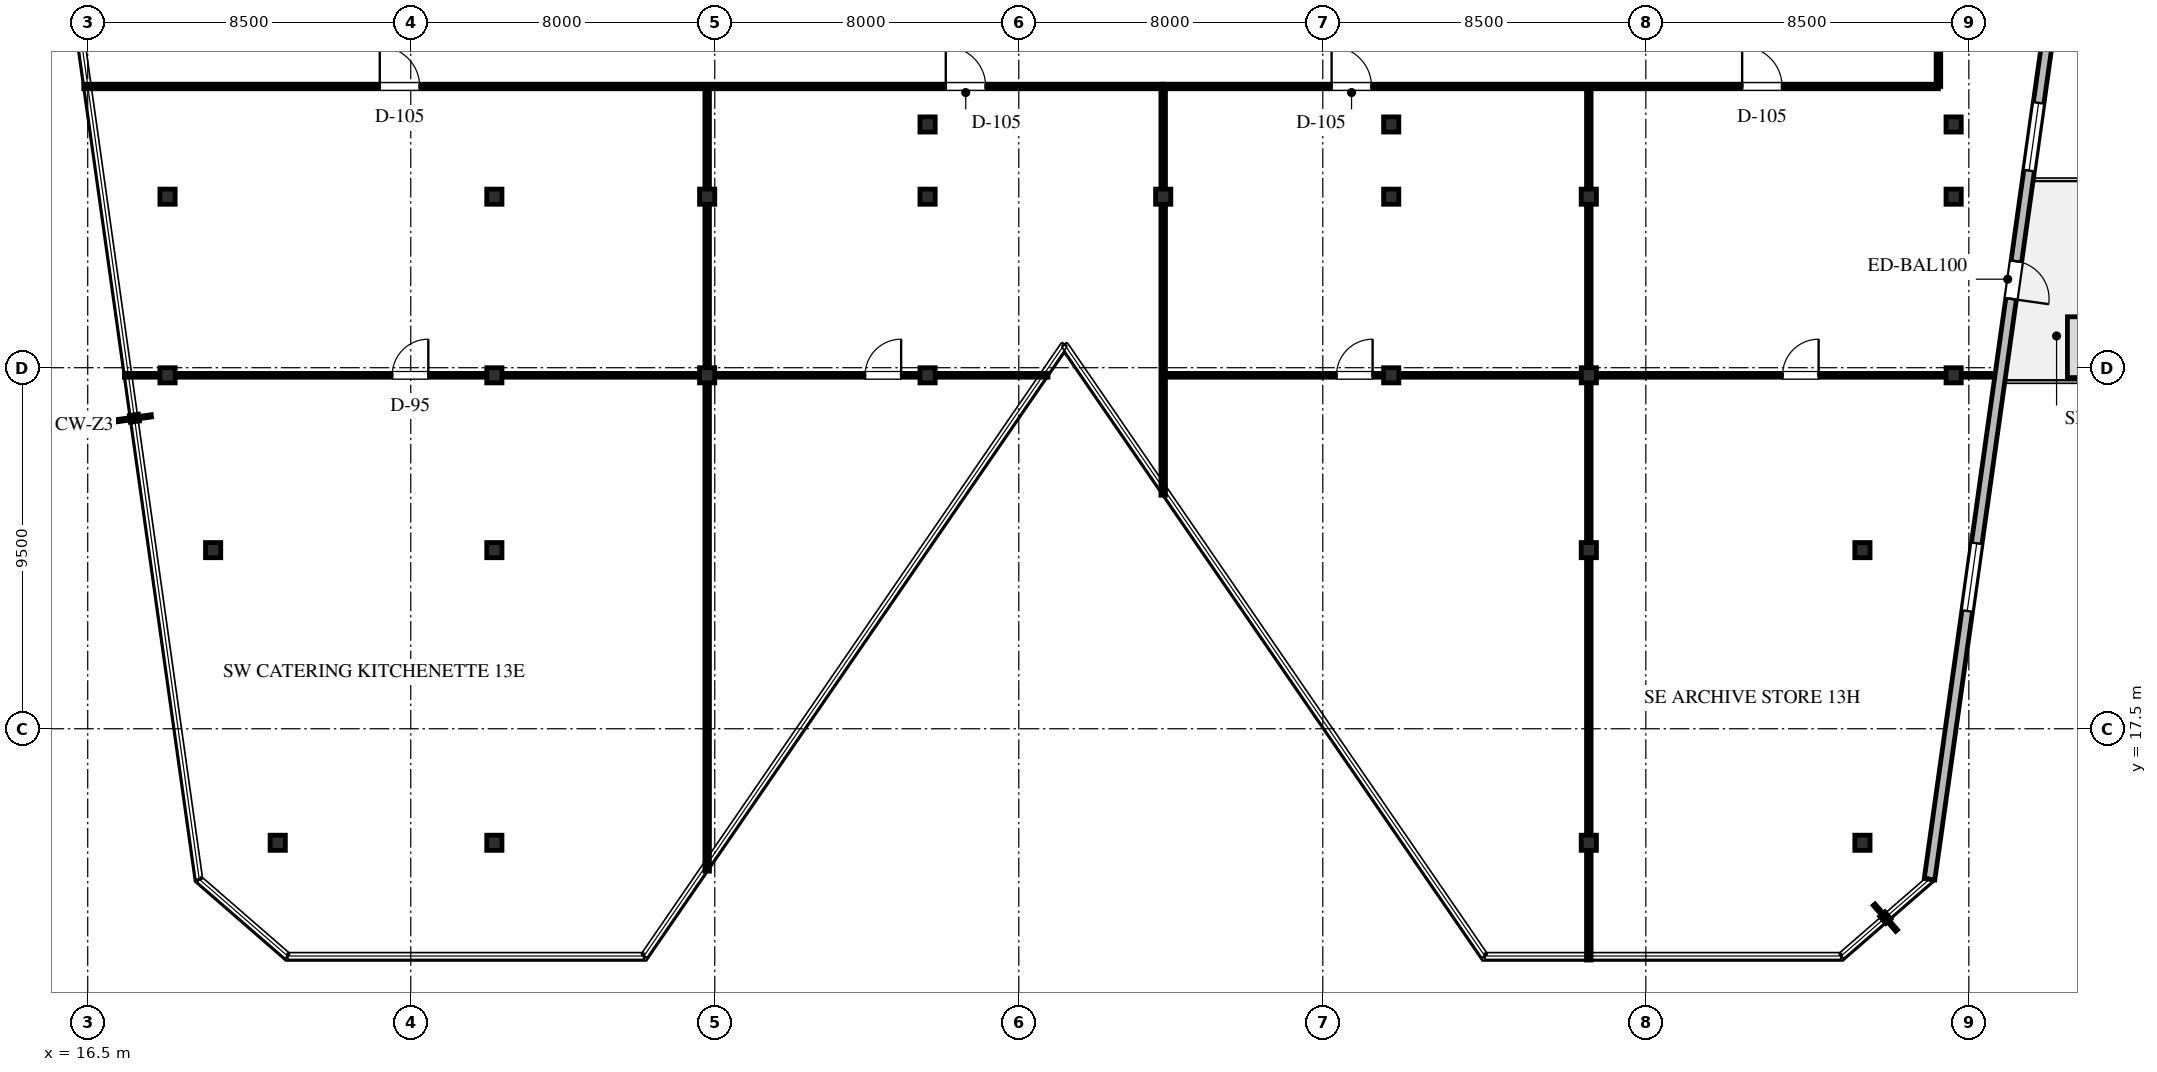
"""IFC4 building model, lengths in metres.
Left out: names, types, materials, properties, quantities, classifications, styles, units other than length and angle.
Written with IfcOpenShell. Run it as: python <this file> out.ifc"""

import sys

from ifc_helpers import new_model, si_unit, direction, frame, frame_2d, origin, origin_2d, place, context, subcontext, project, spatial, rectangle, i_section, extrude, element, fill, save


model = new_model("IFC4")
c1 = context("Model", 3, precision=1e-05, world=origin(), true_north=direction((0.0, 1.0)))
c2 = subcontext(c1, "Body", "Model", "MODEL_VIEW")
j1 = project(units=[si_unit("LENGTHUNIT", "METRE"), si_unit("PLANEANGLEUNIT", "RADIAN")], contexts=[c1])
p1 = place(None, origin())
s1 = spatial("IfcSite", under=j1, at=p1, CompositionType="ELEMENT")
p2 = place(p1, origin())
s2 = spatial("IfcBuilding", under=s1, at=p2, CompositionType="ELEMENT")
p3 = place(p2, frame((0.0, 0.0, 204.5)))
s3 = spatial("IfcBuildingStorey", under=s2, at=p3, CompositionType="ELEMENT", Elevation=204.5)
for number, where, z_axis, x_axis in (
    (1, (21.5, 14.5, 0.0), (0.0, 0.0, 1.0), (1.0, 0.0, 0.0)),
    (2, (18.6, 26.8, 0.0), (0.0, 0.0, 1.0), (1.0, 0.0, 0.0)),
    (3, (27.2, 26.8, 0.0), (0.0, 0.0, 1.0), (1.0, 0.0, 0.0)),
    (4, (32.8, 26.8, 0.0), (0.0, 0.0, 1.0), (1.0, 0.0, 0.0)),
    (5, (38.6, 26.8, 0.0), (0.0, 0.0, 1.0), (1.0, 0.0, 0.0)),
    (6, (50.8, 26.8, 0.0), (0.0, 0.0, 1.0), (1.0, 0.0, 0.0)),
    (7, (56.0, 26.8, 0.0), (0.0, 0.0, 1.0), (1.0, 0.0, 0.0)),
    (8, (65.6, 26.8, 0.0), (0.0, 0.0, 1.0), (1.0, 0.0, 0.0)),
    (9, (18.6, 31.5, 0.0), (0.0, 0.0, 1.0), (1.0, 0.0, 0.0)),
    (10, (27.2, 31.5, 0.0), (0.0, 0.0, 1.0), (1.0, 0.0, 0.0)),
    (11, (32.8, 31.5, 0.0), (0.0, 0.0, 1.0), (1.0, 0.0, 0.0)),
    (12, (27.2, 14.5, 0.0), (0.0, 0.0, 1.0), (1.0, 0.0, 0.0)),
    (13, (38.6, 31.5, 0.0), (0.0, 0.0, 1.0), (1.0, 0.0, 0.0)),
    (14, (44.8, 31.5, 0.0), (0.0, 0.0, 1.0), (1.0, 0.0, 0.0)),
    (15, (50.8, 31.5, 0.0), (0.0, 0.0, 1.0), (1.0, 0.0, 0.0)),
    (16, (56.0, 31.5, 0.0), (0.0, 0.0, 1.0), (1.0, 0.0, 0.0)),
    (17, (65.6, 31.5, 0.0), (0.0, 0.0, 1.0), (1.0, 0.0, 0.0)),
    (18, (56.0, 14.5, 0.0), (0.0, 0.0, 1.0), (1.0, 0.0, 0.0)),
    (19, (63.2, 14.5, 0.0), (0.0, 0.0, 1.0), (1.0, 0.0, 0.0)),
    (20, (19.8, 22.2, 0.0), (0.0, 0.0, 1.0), (1.0, 0.0, 0.0)),
    (21, (27.2, 22.2, 0.0), (0.0, 0.0, 1.0), (1.0, 0.0, 0.0)),
    (22, (56.0, 22.2, 0.0), (0.0, 0.0, 1.0), (1.0, 0.0, 0.0)),
    (23, (63.2, 22.2, 0.0), (0.0, 0.0, 1.0), (1.0, 0.0, 0.0)),
    (24, (38.6, 33.4, 0.0), (0.0, 0.0, 1.0), (1.0, 0.0, 0.0)),
    (25, (50.8, 33.4, 0.0), (0.0, 0.0, 1.0), (1.0, 0.0, 0.0)),
    (26, (65.6, 33.4, 0.0), (0.0, 0.0, 1.0), (1.0, 0.0, 0.0)),
):
    element("IfcColumn", number, at=place(p3, frame(where, z_axis=z_axis, x_axis=x_axis)), inside=s3, PredefinedType="COLUMN", context=c2, shape_type="SweptSolid", body=[
        extrude(i_section(OverallWidth=0.401, OverallDepth=0.399, WebThickness=0.025, FlangeThickness=0.04, FilletRadius=0.03, at=origin_2d()), origin(), (0.0, 0.0, 1.0), 4.0),
    ])
p4 = place(p3, frame((68.375, 37.8, 0.0), z_axis=(0.0, 0.0, 1.0), x_axis=(-0.139173290738, -0.99026804207, 0.0)))
e27 = element("IfcWall", 27, at=p4, inside=s3, PredefinedType="STANDARD", context=c2, shape_type="SweptSolid", body=[
    extrude(rectangle(XDim=24.498, YDim=0.28, at=frame_2d((12.249, 0.0))), origin(), (0.0, 0.0, 1.0), 3.755),
])
p5 = place(p4, frame((8.077, 0.0, 0.0)))
e28 = element("IfcOpeningElement", 28, at=p5, cuts=e27, PredefinedType="OPENING", context=c2, shape_type="SweptSolid", body=[
    extrude(rectangle(XDim=1.0, YDim=2.15, at=frame_2d((0.5, 1.075))), frame((0.0, 0.15, 0.0), z_axis=(0.0, -1.0, 0.0), x_axis=(1.0, 0.0, 0.0)), (0.0, 0.0, 1.0), 0.3),
])
p6 = place(p4, frame((3.869, 0.0, 0.65)))
e29 = element("IfcOpeningElement", 29, at=p6, cuts=e27, PredefinedType="OPENING", context=c2, shape_type="SweptSolid", body=[
    extrude(rectangle(XDim=1.8, YDim=2.1, at=frame_2d((0.9, 1.05))), frame((0.0, 0.15, 0.0), z_axis=(0.0, -1.0, 0.0), x_axis=(1.0, 0.0, 0.0)), (0.0, 0.0, 1.0), 0.3),
])
p7 = place(p4, frame((15.571, 0.0, 0.65)))
e30 = element("IfcOpeningElement", 30, at=p7, cuts=e27, PredefinedType="OPENING", context=c2, shape_type="SweptSolid", body=[
    extrude(rectangle(XDim=1.8, YDim=2.1, at=frame_2d((0.9, 1.05))), frame((0.0, 0.15, 0.0), z_axis=(0.0, -1.0, 0.0), x_axis=(1.0, 0.0, 0.0)), (0.0, 0.0, 1.0), 0.3),
])
p8 = place(p3, frame((16.397, 34.4, 0.0), z_axis=(0.0, 0.0, 1.0), x_axis=(1.0, 0.0, 0.0)))
e31 = element("IfcWall", 31, at=p8, inside=s3, PredefinedType="PARTITIONING", context=c2, shape_type="SweptSolid", body=[
    extrude(rectangle(XDim=28.403, YDim=0.12, at=frame_2d((14.202, 0.0))), origin(), (0.0, 0.0, 1.0), 2.982),
])
p9 = place(p8, frame((7.788, 0.0, 0.0)))
e32 = element("IfcOpeningElement", 32, at=p9, cuts=e31, PredefinedType="OPENING", context=c2, shape_type="SweptSolid", body=[
    extrude(rectangle(XDim=1.05, YDim=2.2, at=frame_2d((0.525, 1.1))), frame((0.0, 0.07, 0.0), z_axis=(0.0, -1.0, 0.0), x_axis=(1.0, 0.0, 0.0)), (0.0, 0.0, 1.0), 0.14),
])
p10 = place(p8, frame((22.682, 0.0, 0.0)))
e33 = element("IfcOpeningElement", 33, at=p10, cuts=e31, PredefinedType="OPENING", context=c2, shape_type="SweptSolid", body=[
    extrude(rectangle(XDim=1.05, YDim=2.2, at=frame_2d((0.525, 1.1))), frame((0.0, 0.07, 0.0), z_axis=(0.0, -1.0, 0.0), x_axis=(1.0, 0.0, 0.0)), (0.0, 0.0, 1.0), 0.14),
])
p11 = place(p3, frame((44.8, 34.4, 0.0), z_axis=(0.0, 0.0, 1.0), x_axis=(1.0, 0.0, 0.0)))
e34 = element("IfcWall", 34, at=p11, inside=s3, PredefinedType="PARTITIONING", context=c2, shape_type="SweptSolid", body=[
    extrude(rectangle(XDim=20.4, YDim=0.12, at=frame_2d((10.2, 0.0))), origin(), (0.0, 0.0, 1.0), 2.982),
])
p12 = place(p11, frame((4.432, 0.0, 0.0)))
e35 = element("IfcOpeningElement", 35, at=p12, cuts=e34, PredefinedType="OPENING", context=c2, shape_type="SweptSolid", body=[
    extrude(rectangle(XDim=1.05, YDim=2.2, at=frame_2d((0.525, 1.1))), frame((0.0, 0.07, 0.0), z_axis=(0.0, -1.0, 0.0), x_axis=(1.0, 0.0, 0.0)), (0.0, 0.0, 1.0), 0.14),
])
p13 = place(p11, frame((15.235, 0.0, 0.0)))
e36 = element("IfcOpeningElement", 36, at=p13, cuts=e34, PredefinedType="OPENING", context=c2, shape_type="SweptSolid", body=[
    extrude(rectangle(XDim=1.05, YDim=2.2, at=frame_2d((0.525, 1.1))), frame((0.0, 0.07, 0.0), z_axis=(0.0, -1.0, 0.0), x_axis=(1.0, 0.0, 0.0)), (0.0, 0.0, 1.0), 0.14),
])
p14 = place(p3, frame((65.2, 34.4, 0.0), z_axis=(0.0, 0.0, 1.0), x_axis=(0.0, 1.0, 0.0)))
e37 = element("IfcWall", 37, at=p14, inside=s3, PredefinedType="PARTITIONING", context=c2, shape_type="SweptSolid", body=[
    extrude(rectangle(XDim=3.317, YDim=0.12, at=frame_2d((1.659, 0.0))), origin(), (0.0, 0.0, 1.0), 2.982),
])
p15 = place(p3, frame((17.465, 26.8, 0.0), z_axis=(0.0, 0.0, 1.0), x_axis=(1.0, 0.0, 0.0)))
e38 = element("IfcWall", 38, at=p15, inside=s3, PredefinedType="PARTITIONING", context=c2, shape_type="SweptSolid", body=[
    extrude(rectangle(XDim=15.267, YDim=0.1, at=frame_2d((7.634, 0.0))), origin(), (0.0, 0.0, 1.0), 2.982),
])
p16 = place(p15, frame((7.048, 0.0, 0.0)))
e39 = element("IfcOpeningElement", 39, at=p16, cuts=e38, PredefinedType="OPENING", context=c2, shape_type="SweptSolid", body=[
    extrude(rectangle(XDim=0.95, YDim=2.15, at=frame_2d((0.475, 1.075))), frame((0.0, 0.06, 0.0), z_axis=(0.0, -1.0, 0.0), x_axis=(1.0, 0.0, 0.0)), (0.0, 0.0, 1.0), 0.12),
])
p17 = place(p3, frame((32.8, 13.754, 0.0), z_axis=(0.0, 0.0, 1.0), x_axis=(0.0, 1.0, 0.0)))
e40 = element("IfcWall", 40, at=p17, inside=s3, PredefinedType="PARTITIONING", context=c2, shape_type="SweptSolid", body=[
    extrude(rectangle(XDim=20.578, YDim=0.12, at=frame_2d((10.289, 0.0))), origin(), (0.0, 0.0, 1.0), 2.982),
])
p18 = place(p3, frame((32.868, 26.8, 0.0), z_axis=(0.0, 0.0, 1.0), x_axis=(1.0, 0.0, 0.0)))
e41 = element("IfcWall", 41, at=p18, inside=s3, PredefinedType="PARTITIONING", context=c2, shape_type="SweptSolid", body=[
    extrude(rectangle(XDim=8.901, YDim=0.1, at=frame_2d((4.451, 0.0))), origin(), (0.0, 0.0, 1.0), 2.982),
])
p19 = place(p18, frame((4.087, 0.0, 0.0)))
e42 = element("IfcOpeningElement", 42, at=p19, cuts=e41, PredefinedType="OPENING", context=c2, shape_type="SweptSolid", body=[
    extrude(rectangle(XDim=0.95, YDim=2.15, at=frame_2d((0.475, 1.075))), frame((0.0, 0.06, 0.0), z_axis=(0.0, -1.0, 0.0), x_axis=(1.0, 0.0, 0.0)), (0.0, 0.0, 1.0), 0.12),
])
p20 = place(p3, frame((44.8, 23.645, 0.0), z_axis=(0.0, 0.0, 1.0), x_axis=(0.0, 1.0, 0.0)))
e43 = element("IfcWall", 43, at=p20, inside=s3, PredefinedType="PARTITIONING", context=c2, shape_type="SweptSolid", body=[
    extrude(rectangle(XDim=10.755, YDim=0.12, at=frame_2d((5.377, 0.0))), origin(), (0.0, 0.0, 1.0), 2.982),
])
p21 = place(p3, frame((44.868, 26.8, 0.0), z_axis=(0.0, 0.0, 1.0), x_axis=(1.0, 0.0, 0.0)))
e44 = element("IfcWall", 44, at=p21, inside=s3, PredefinedType="PARTITIONING", context=c2, shape_type="SweptSolid", body=[
    extrude(rectangle(XDim=11.064, YDim=0.1, at=frame_2d((5.532, 0.0))), origin(), (0.0, 0.0, 1.0), 2.982),
])
p22 = place(p21, frame((4.493, 0.0, 0.0)))
e45 = element("IfcOpeningElement", 45, at=p22, cuts=e44, PredefinedType="OPENING", context=c2, shape_type="SweptSolid", body=[
    extrude(rectangle(XDim=0.95, YDim=2.15, at=frame_2d((0.475, 1.075))), frame((0.0, 0.06, 0.0), z_axis=(0.0, -1.0, 0.0), x_axis=(1.0, 0.0, 0.0)), (0.0, 0.0, 1.0), 0.12),
])
p23 = place(p3, frame((56.0, 11.415, 0.0), z_axis=(0.0, 0.0, 1.0), x_axis=(0.0, 1.0, 0.0)))
e46 = element("IfcWall", 46, at=p23, inside=s3, PredefinedType="PARTITIONING", context=c2, shape_type="SweptSolid", body=[
    extrude(rectangle(XDim=22.917, YDim=0.12, at=frame_2d((11.458, 0.0))), origin(), (0.0, 0.0, 1.0), 2.982),
])
p24 = place(p3, frame((56.068, 26.8, 0.0), z_axis=(0.0, 0.0, 1.0), x_axis=(1.0, 0.0, 0.0)))
e47 = element("IfcWall", 47, at=p24, inside=s3, PredefinedType="PARTITIONING", context=c2, shape_type="SweptSolid", body=[
    extrude(rectangle(XDim=10.594, YDim=0.1, at=frame_2d((5.297, 0.0))), origin(), (0.0, 0.0, 1.0), 2.982),
])
p25 = place(p24, frame((5.03, 0.0, 0.0)))
e48 = element("IfcOpeningElement", 48, at=p25, cuts=e47, PredefinedType="OPENING", context=c2, shape_type="SweptSolid", body=[
    extrude(rectangle(XDim=0.95, YDim=2.15, at=frame_2d((0.475, 1.075))), frame((0.0, 0.06, 0.0), z_axis=(0.0, -1.0, 0.0), x_axis=(1.0, 0.0, 0.0)), (0.0, 0.0, 1.0), 0.12),
])
p26 = place(p5, origin())
e49 = element("IfcDoor", 49, at=p26, inside=s3, OperationType="SINGLE_SWING_RIGHT", PredefinedType="DOOR", context=c2, shape_type="SweptSolid", body=[
    extrude(rectangle(XDim=1.0, YDim=2.15, at=frame_2d((0.5, 1.075))), frame((0.0, 0.025, 0.0), z_axis=(0.0, -1.0, 0.0), x_axis=(1.0, 0.0, 0.0)), (0.0, 0.0, 1.0), 0.05),
])
fill(e28, e49)
p27 = place(p6, origin())
e50 = element("IfcWindow", 50, at=p27, inside=s3, PartitioningType="SINGLE_PANEL", PredefinedType="WINDOW", context=c2, shape_type="SweptSolid", body=[
    extrude(rectangle(XDim=1.8, YDim=2.1, at=frame_2d((0.9, 1.05))), frame((0.0, 0.03, 0.0), z_axis=(0.0, -1.0, 0.0), x_axis=(1.0, 0.0, 0.0)), (0.0, 0.0, 1.0), 0.06),
])
fill(e29, e50)
p28 = place(p7, origin())
e51 = element("IfcWindow", 51, at=p28, inside=s3, PartitioningType="SINGLE_PANEL", PredefinedType="WINDOW", context=c2, shape_type="SweptSolid", body=[
    extrude(rectangle(XDim=1.8, YDim=2.1, at=frame_2d((0.9, 1.05))), frame((0.0, 0.03, 0.0), z_axis=(0.0, -1.0, 0.0), x_axis=(1.0, 0.0, 0.0)), (0.0, 0.0, 1.0), 0.06),
])
fill(e30, e51)
p29 = place(p9, origin())
e52 = element("IfcDoor", 52, at=p29, inside=s3, OperationType="SINGLE_SWING_LEFT", PredefinedType="DOOR", context=c2, shape_type="SweptSolid", body=[
    extrude(rectangle(XDim=1.05, YDim=2.2, at=frame_2d((0.525, 1.1))), frame((0.0, 0.025, 0.0), z_axis=(0.0, -1.0, 0.0), x_axis=(1.0, 0.0, 0.0)), (0.0, 0.0, 1.0), 0.05),
])
fill(e32, e52)
p30 = place(p16, origin())
e53 = element("IfcDoor", 53, at=p30, inside=s3, OperationType="SINGLE_SWING_RIGHT", PredefinedType="DOOR", context=c2, shape_type="SweptSolid", body=[
    extrude(rectangle(XDim=0.95, YDim=2.15, at=frame_2d((0.475, 1.075))), frame((0.0, 0.025, 0.0), z_axis=(0.0, -1.0, 0.0), x_axis=(1.0, 0.0, 0.0)), (0.0, 0.0, 1.0), 0.05),
])
fill(e39, e53)
p31 = place(p10, origin())
e54 = element("IfcDoor", 54, at=p31, inside=s3, OperationType="SINGLE_SWING_LEFT", PredefinedType="DOOR", context=c2, shape_type="SweptSolid", body=[
    extrude(rectangle(XDim=1.05, YDim=2.2, at=frame_2d((0.525, 1.1))), frame((0.0, 0.025, 0.0), z_axis=(0.0, -1.0, 0.0), x_axis=(1.0, 0.0, 0.0)), (0.0, 0.0, 1.0), 0.05),
])
fill(e33, e54)
p32 = place(p19, origin())
e55 = element("IfcDoor", 55, at=p32, inside=s3, OperationType="SINGLE_SWING_RIGHT", PredefinedType="DOOR", context=c2, shape_type="SweptSolid", body=[
    extrude(rectangle(XDim=0.95, YDim=2.15, at=frame_2d((0.475, 1.075))), frame((0.0, 0.025, 0.0), z_axis=(0.0, -1.0, 0.0), x_axis=(1.0, 0.0, 0.0)), (0.0, 0.0, 1.0), 0.05),
])
fill(e42, e55)
p33 = place(p12, origin())
e56 = element("IfcDoor", 56, at=p33, inside=s3, OperationType="SINGLE_SWING_LEFT", PredefinedType="DOOR", context=c2, shape_type="SweptSolid", body=[
    extrude(rectangle(XDim=1.05, YDim=2.2, at=frame_2d((0.525, 1.1))), frame((0.0, 0.025, 0.0), z_axis=(0.0, -1.0, 0.0), x_axis=(1.0, 0.0, 0.0)), (0.0, 0.0, 1.0), 0.05),
])
fill(e35, e56)
p34 = place(p22, origin())
e57 = element("IfcDoor", 57, at=p34, inside=s3, OperationType="SINGLE_SWING_RIGHT", PredefinedType="DOOR", context=c2, shape_type="SweptSolid", body=[
    extrude(rectangle(XDim=0.95, YDim=2.15, at=frame_2d((0.475, 1.075))), frame((0.0, 0.025, 0.0), z_axis=(0.0, -1.0, 0.0), x_axis=(1.0, 0.0, 0.0)), (0.0, 0.0, 1.0), 0.05),
])
fill(e45, e57)
p35 = place(p13, origin())
e58 = element("IfcDoor", 58, at=p35, inside=s3, OperationType="SINGLE_SWING_LEFT", PredefinedType="DOOR", context=c2, shape_type="SweptSolid", body=[
    extrude(rectangle(XDim=1.05, YDim=2.2, at=frame_2d((0.525, 1.1))), frame((0.0, 0.025, 0.0), z_axis=(0.0, -1.0, 0.0), x_axis=(1.0, 0.0, 0.0)), (0.0, 0.0, 1.0), 0.05),
])
fill(e36, e58)
p36 = place(p25, origin())
e59 = element("IfcDoor", 59, at=p36, inside=s3, OperationType="SINGLE_SWING_RIGHT", PredefinedType="DOOR", context=c2, shape_type="SweptSolid", body=[
    extrude(rectangle(XDim=0.95, YDim=2.15, at=frame_2d((0.475, 1.075))), frame((0.0, 0.025, 0.0), z_axis=(0.0, -1.0, 0.0), x_axis=(1.0, 0.0, 0.0)), (0.0, 0.0, 1.0), 0.05),
])
fill(e48, e59)
save(model, sys.argv[1])
